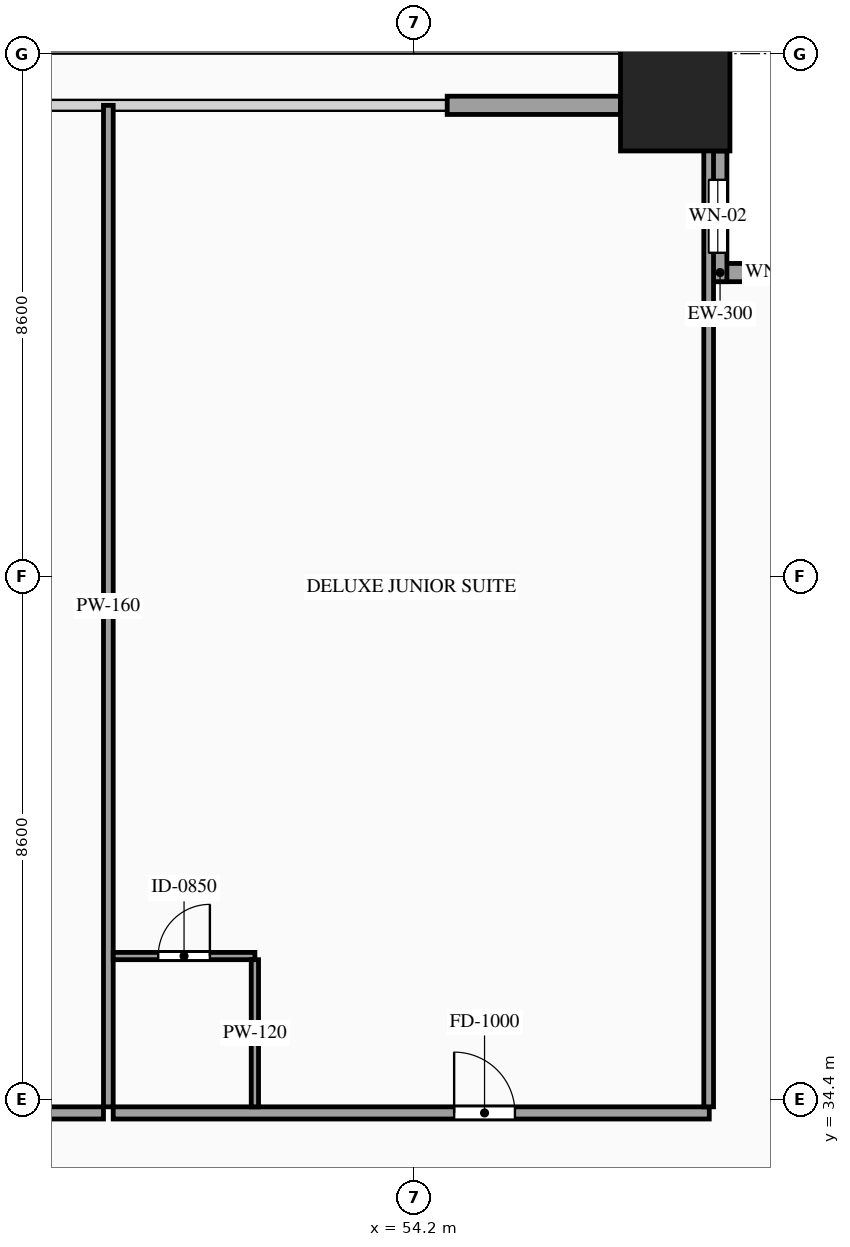
"""IFC4 building model, lengths in metres.
Left out: names, types, materials, properties, quantities, classifications, styles, units other than length and angle.
Written with IfcOpenShell. Run it as: python <this file> out.ifc"""

import sys

from ifc_helpers import new_model, si_unit, direction, frame, frame_2d, origin, origin_2d, place, context, subcontext, project, spatial, rectangle, hollow_rectangle, extrude, source, transform, mapped, element, fill, save


model = new_model("IFC4")
c1 = context("Model", 3, precision=1e-05, world=origin(), true_north=direction((0.0, 1.0)))
c2 = subcontext(c1, "Body", "Model", "MODEL_VIEW")
j1 = project(units=[si_unit("LENGTHUNIT", "METRE"), si_unit("PLANEANGLEUNIT", "RADIAN")], contexts=[c1])
p1 = place(None, origin())
s1 = spatial("IfcSite", under=j1, at=p1, CompositionType="ELEMENT")
p2 = place(p1, origin())
s2 = spatial("IfcBuilding", under=s1, at=p2, CompositionType="ELEMENT")
p3 = place(p2, frame((0.0, 0.0, 82.0)))
s3 = spatial("IfcBuildingStorey", under=s2, at=p3, CompositionType="ELEMENT", Elevation=82.0)
m1 = source(origin(), c2, "Body", "SweptSolid", [
    extrude(hollow_rectangle(XDim=1.8, YDim=1.8, WallThickness=0.08, at=origin_2d()), origin(), (0.0, 0.0, 1.0), 3.32),
])
p4 = place(p3, frame((58.5, 50.9, 0.0), z_axis=(0.0, 0.0, 1.0), x_axis=(1.0, 0.0, 0.0)))
e1 = element("IfcColumn", 1, at=p4, inside=s3, PredefinedType="COLUMN", context=c2, shape_type="MappedRepresentation", body=[
    mapped(m1, transform((0.0, 0.0, 0.0), scale=1.0)),
])
p5 = place(p3, frame((61.2, 48.0, 0.0), z_axis=(0.0, 0.0, 1.0), x_axis=(-1.0, 0.0, 0.0)))
e2 = element("IfcWall", 2, at=p5, inside=s3, PredefinedType="SOLIDWALL", context=c2, shape_type="SweptSolid", body=[
    extrude(rectangle(XDim=2.15, YDim=0.3, at=frame_2d((1.075, 0.0))), origin(), (0.0, 0.0, 1.0), 3.32),
])
p6 = place(p5, frame((0.625, 0.0, 0.85)))
e3 = element("IfcOpeningElement", 3, at=p6, cuts=e2, PredefinedType="OPENING", context=c2, shape_type="SweptSolid", body=[
    extrude(rectangle(XDim=0.9, YDim=1.5, at=frame_2d((0.45, 0.75))), frame((0.0, 0.165, 0.0), z_axis=(0.0, -1.0, 0.0), x_axis=(1.0, 0.0, 0.0)), (0.0, 0.0, 1.0), 0.33),
])
p7 = place(p3, frame((59.2, 47.85, 0.0), z_axis=(0.0, 0.0, 1.0), x_axis=(0.0, 1.0, 0.0)))
e4 = element("IfcWall", 4, at=p7, inside=s3, PredefinedType="SOLIDWALL", context=c2, shape_type="SweptSolid", body=[
    extrude(rectangle(XDim=2.15, YDim=0.3, at=frame_2d((1.075, 0.0))), origin(), (0.0, 0.0, 1.0), 3.32),
])
p8 = place(p7, frame((0.475, 0.0, 0.85)))
e5 = element("IfcOpeningElement", 5, at=p8, cuts=e4, PredefinedType="OPENING", context=c2, shape_type="SweptSolid", body=[
    extrude(rectangle(XDim=1.2, YDim=2.1, at=frame_2d((0.6, 1.05))), frame((0.0, 0.165, 0.0), z_axis=(0.0, -1.0, 0.0), x_axis=(1.0, 0.0, 0.0)), (0.0, 0.0, 1.0), 0.33),
])
m2 = source(origin(), c2, "Body", "SweptSolid", [
    extrude(rectangle(XDim=2.85, YDim=0.3, at=frame_2d((1.425, 0.0))), origin(), (0.0, 0.0, 1.0), 2.715),
])
p9 = place(p3, frame((54.75, 50.75, 0.0), z_axis=(0.0, 0.0, 1.0), x_axis=(1.0, 0.0, 0.0)))
e6 = element("IfcWall", 6, at=p9, inside=s3, PredefinedType="SOLIDWALL", context=c2, shape_type="MappedRepresentation", body=[
    mapped(m2, transform((0.0, 0.0, 0.0), scale=1.0)),
])
p10 = place(p3, frame((43.257, 34.18, 0.0), z_axis=(0.0, 0.0, 1.0), x_axis=(1.0, 0.0, 0.0)))
e7 = element("IfcWall", 7, at=p10, inside=s3, PredefinedType="PARTITIONING", context=c2, shape_type="SweptSolid", body=[
    extrude(rectangle(XDim=5.84, YDim=0.2, at=frame_2d((2.92, 0.0))), origin(), (0.0, 0.0, 1.0), 3.32),
])
p11 = place(p10, frame((3.625, 0.0, 0.0)))
e8 = element("IfcOpeningElement", 8, at=p11, cuts=e7, PredefinedType="OPENING", context=c2, shape_type="SweptSolid", body=[
    extrude(rectangle(XDim=1.0, YDim=2.2, at=frame_2d((0.5, 1.1))), frame((0.0, 0.115, 0.0), z_axis=(0.0, -1.0, 0.0), x_axis=(1.0, 0.0, 0.0)), (0.0, 0.0, 1.0), 0.23),
])
m3 = source(origin(), c2, "Body", "SweptSolid", [
    extrude(rectangle(XDim=16.47, YDim=0.16, at=frame_2d((8.235, 0.0))), origin(), (0.0, 0.0, 1.0), 3.32),
])
p12 = place(p3, frame((49.177, 34.28, 0.0), z_axis=(0.0, 0.0, 1.0), x_axis=(0.0, 1.0, 0.0)))
e9 = element("IfcWall", 9, at=p12, inside=s3, PredefinedType="PARTITIONING", context=c2, shape_type="MappedRepresentation", body=[
    mapped(m3, transform((0.0, 0.0, 0.0), scale=1.0)),
])
p13 = place(p3, frame((49.257, 34.18, 0.0), z_axis=(0.0, 0.0, 1.0), x_axis=(1.0, 0.0, 0.0)))
e10 = element("IfcWall", 10, at=p13, inside=s3, PredefinedType="PARTITIONING", context=c2, shape_type="SweptSolid", body=[
    extrude(rectangle(XDim=9.803, YDim=0.2, at=frame_2d((4.901, 0.0))), origin(), (0.0, 0.0, 1.0), 3.32),
])
p14 = place(p13, frame((5.607, 0.0, 0.0)))
e11 = element("IfcOpeningElement", 11, at=p14, cuts=e10, PredefinedType="OPENING", context=c2, shape_type="SweptSolid", body=[
    extrude(rectangle(XDim=1.0, YDim=2.2, at=frame_2d((0.5, 1.1))), frame((0.0, 0.115, 0.0), z_axis=(0.0, -1.0, 0.0), x_axis=(1.0, 0.0, 0.0)), (0.0, 0.0, 1.0), 0.23),
])
m4 = source(origin(), c2, "Body", "SweptSolid", [
    extrude(rectangle(XDim=16.32, YDim=0.16, at=frame_2d((8.16, 0.0))), origin(), (0.0, 0.0, 1.0), 3.32),
])
p15 = place(p3, frame((59.05, 34.28, 0.0), z_axis=(0.0, 0.0, 1.0), x_axis=(0.0, 1.0, 0.0)))
e12 = element("IfcWall", 12, at=p15, inside=s3, PredefinedType="PARTITIONING", context=c2, shape_type="MappedRepresentation", body=[
    mapped(m4, transform((0.0, 0.0, 0.0), scale=1.0)),
])
p16 = place(p3, frame((49.257, 36.76, 0.0), z_axis=(0.0, 0.0, 1.0), x_axis=(1.0, 0.0, 0.0)))
e13 = element("IfcWall", 13, at=p16, inside=s3, PredefinedType="PARTITIONING", context=c2, shape_type="SweptSolid", body=[
    extrude(rectangle(XDim=2.33, YDim=0.12, at=frame_2d((1.165, 0.0))), origin(), (0.0, 0.0, 1.0), 3.32),
])
p17 = place(p16, frame((0.74, 0.0, 0.0)))
e14 = element("IfcOpeningElement", 14, at=p17, cuts=e13, PredefinedType="OPENING", context=c2, shape_type="SweptSolid", body=[
    extrude(rectangle(XDim=0.85, YDim=2.1, at=frame_2d((0.425, 1.05))), frame((0.0, 0.075, 0.0), z_axis=(0.0, -1.0, 0.0), x_axis=(1.0, 0.0, 0.0)), (0.0, 0.0, 1.0), 0.15),
])
m5 = source(origin(), c2, "Body", "SweptSolid", [
    extrude(rectangle(XDim=2.42, YDim=0.12, at=frame_2d((1.21, 0.0))), origin(), (0.0, 0.0, 1.0), 3.32),
])
p18 = place(p3, frame((51.587, 34.28, 0.0), z_axis=(0.0, 0.0, 1.0), x_axis=(0.0, 1.0, 0.0)))
e15 = element("IfcWall", 15, at=p18, inside=s3, PredefinedType="PARTITIONING", context=c2, shape_type="MappedRepresentation", body=[
    mapped(m5, transform((0.0, 0.0, 0.0), scale=1.0)),
])
m6 = source(origin(), c2, "Body", "SweptSolid", [
    extrude(rectangle(XDim=0.9, YDim=1.5, at=frame_2d((0.45, 0.75))), frame((0.0, 0.03, 0.0), z_axis=(0.0, -1.0, 0.0), x_axis=(1.0, 0.0, 0.0)), (0.0, 0.0, 1.0), 0.06),
])
p19 = place(p6, origin())
e16 = element("IfcWindow", 16, at=p19, inside=s3, PartitioningType="SINGLE_PANEL", PredefinedType="WINDOW", context=c2, shape_type="MappedRepresentation", body=[
    mapped(m6, transform((0.0, 0.0, 0.0), scale=1.0)),
])
fill(e3, e16)
m7 = source(origin(), c2, "Body", "SweptSolid", [
    extrude(rectangle(XDim=1.2, YDim=2.1, at=frame_2d((0.6, 1.05))), frame((0.0, 0.03, 0.0), z_axis=(0.0, -1.0, 0.0), x_axis=(1.0, 0.0, 0.0)), (0.0, 0.0, 1.0), 0.06),
])
p20 = place(p8, origin())
e17 = element("IfcWindow", 17, at=p20, inside=s3, PartitioningType="SINGLE_PANEL", PredefinedType="WINDOW", context=c2, shape_type="MappedRepresentation", body=[
    mapped(m7, transform((0.0, 0.0, 0.0), scale=1.0)),
])
fill(e5, e17)
m8 = source(origin(), c2, "Body", "SweptSolid", [
    extrude(rectangle(XDim=1.0, YDim=2.2, at=frame_2d((0.5, 1.1))), frame((0.0, 0.025, 0.0), z_axis=(0.0, -1.0, 0.0), x_axis=(1.0, 0.0, 0.0)), (0.0, 0.0, 1.0), 0.05),
])
p21 = place(p14, origin())
e18 = element("IfcDoor", 18, at=p21, inside=s3, OperationType="SINGLE_SWING_LEFT", PredefinedType="DOOR", context=c2, shape_type="MappedRepresentation", body=[
    mapped(m8, transform((0.0, 0.0, 0.0), scale=1.0)),
])
fill(e11, e18)
m9 = source(origin(), c2, "Body", "SweptSolid", [
    extrude(rectangle(XDim=0.85, YDim=2.1, at=frame_2d((0.425, 1.05))), frame((0.0, 0.025, 0.0), z_axis=(0.0, -1.0, 0.0), x_axis=(1.0, 0.0, 0.0)), (0.0, 0.0, 1.0), 0.05),
])
p22 = place(p17, origin())
e19 = element("IfcDoor", 19, at=p22, inside=s3, OperationType="SINGLE_SWING_RIGHT", PredefinedType="DOOR", context=c2, shape_type="MappedRepresentation", body=[
    mapped(m9, transform((0.0, 0.0, 0.0), scale=1.0)),
])
fill(e14, e19)
save(model, sys.argv[1])
